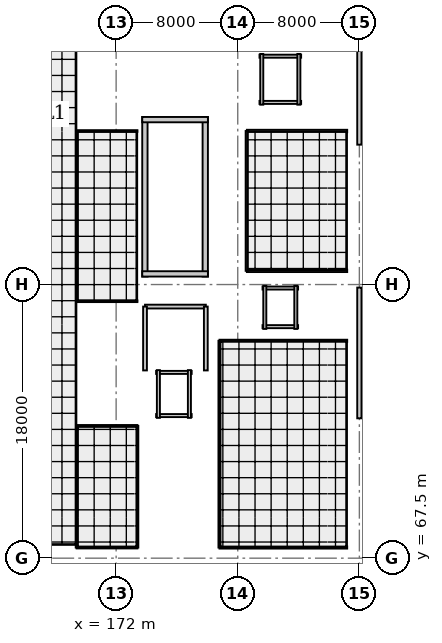
"""IFC4 building model, lengths in metres.
Left out: names, types, materials, properties, quantities, classifications, styles, units other than length and angle.
Written with IfcOpenShell. Run it as: python <this file> out.ifc"""

import sys

from ifc_helpers import new_model, si_unit, direction, frame, frame_2d, origin, origin_2d, place, context, subcontext, project, spatial, rectangle, i_section, extrude, element, fill, save


model = new_model("IFC4")
c1 = context("Model", 3, precision=1e-05, world=origin(), true_north=direction((0.0, 1.0)))
c2 = subcontext(c1, "Body", "Model", "MODEL_VIEW")
j1 = project(units=[si_unit("LENGTHUNIT", "METRE"), si_unit("PLANEANGLEUNIT", "RADIAN")], contexts=[c1])
p1 = place(None, origin())
s1 = spatial("IfcSite", under=j1, at=p1, CompositionType="ELEMENT")
p2 = place(p1, origin())
s2 = spatial("IfcBuilding", under=s1, at=p2, CompositionType="ELEMENT")
p3 = place(p2, frame((0.0, 0.0, 14.4)))
s3 = spatial("IfcBuildingStorey", under=s2, at=p3, CompositionType="ELEMENT", Elevation=14.4)
for number, where, z_axis, x_axis in (
    (1, (172.0, 67.5, 0.0), (0.0, 0.0, 1.0), (1.0, 0.0, 0.0)),
    (2, (172.0, 76.5, 0.0), (0.0, 0.0, 1.0), (1.0, 0.0, 0.0)),
    (3, (172.0, 85.5, 0.0), (0.0, 0.0, 1.0), (1.0, 0.0, 0.0)),
    (4, (172.0, 94.5, 0.0), (0.0, 0.0, 1.0), (1.0, 0.0, 0.0)),
    (5, (180.0, 67.5, 0.0), (0.0, 0.0, 1.0), (1.0, 0.0, 0.0)),
    (6, (180.0, 76.5, 0.0), (0.0, 0.0, 1.0), (1.0, 0.0, 0.0)),
    (7, (180.0, 85.5, 0.0), (0.0, 0.0, 1.0), (1.0, 0.0, 0.0)),
    (8, (180.0, 94.5, 0.0), (0.0, 0.0, 1.0), (1.0, 0.0, 0.0)),
    (9, (188.0, 67.5, 0.0), (0.0, 0.0, 1.0), (1.0, 0.0, 0.0)),
    (10, (188.0, 76.5, 0.0), (0.0, 0.0, 1.0), (1.0, 0.0, 0.0)),
    (11, (188.0, 85.5, 0.0), (0.0, 0.0, 1.0), (1.0, 0.0, 0.0)),
    (12, (188.0, 94.5, 0.0), (0.0, 0.0, 1.0), (1.0, 0.0, 0.0)),
):
    element("IfcColumn", number, at=place(p3, frame(where, z_axis=z_axis, x_axis=x_axis)), inside=s3, PredefinedType="COLUMN", context=c2, shape_type="SweptSolid", body=[
        extrude(i_section(OverallWidth=0.4, OverallDepth=0.4, WebThickness=0.013, FlangeThickness=0.021, FilletRadius=0.022, at=origin_2d()), origin(), (0.0, 0.0, 1.0), 3.2),
    ])
p4 = place(p3, frame((188.0, 85.3, 0.0), z_axis=(0.0, 0.0, 1.0), x_axis=(0.0, -1.0, 0.0)))
e13 = element("IfcWall", 13, at=p4, inside=s3, PredefinedType="SOLIDWALL", context=c2, shape_type="SweptSolid", body=[
    extrude(rectangle(XDim=8.6, YDim=0.28, at=frame_2d((4.3, 0.0))), origin(), (0.0, 0.0, 1.0), 2.485),
])
p5 = place(p4, frame((1.665, 0.0, 0.9)))
e14 = element("IfcOpeningElement", 14, at=p5, cuts=e13, PredefinedType="OPENING", context=c2, shape_type="SweptSolid", body=[
    extrude(rectangle(XDim=1.15, YDim=1.45, at=frame_2d((0.575, 0.725))), frame((0.0, 0.15, 0.0), z_axis=(0.0, -1.0, 0.0), x_axis=(1.0, 0.0, 0.0)), (0.0, 0.0, 1.0), 0.3),
])
p6 = place(p4, frame((5.785, 0.0, 0.9)))
e15 = element("IfcOpeningElement", 15, at=p6, cuts=e13, PredefinedType="OPENING", context=c2, shape_type="SweptSolid", body=[
    extrude(rectangle(XDim=1.15, YDim=1.45, at=frame_2d((0.575, 0.725))), frame((0.0, 0.15, 0.0), z_axis=(0.0, -1.0, 0.0), x_axis=(1.0, 0.0, 0.0)), (0.0, 0.0, 1.0), 0.3),
])
p7 = place(p3, frame((188.0, 103.3, 0.0), z_axis=(0.0, 0.0, 1.0), x_axis=(0.0, -1.0, 0.0)))
e16 = element("IfcWall", 16, at=p7, inside=s3, PredefinedType="SOLIDWALL", context=c2, shape_type="SweptSolid", body=[
    extrude(rectangle(XDim=8.6, YDim=0.28, at=frame_2d((4.3, 0.0))), origin(), (0.0, 0.0, 1.0), 2.395),
])
for number, where, z_axis, x_axis in (
    (17, (177.863, 86.025, 0.0), (0.0, 0.0, 1.0), (0.0, 1.0, 0.0)),
    (18, (173.893, 96.522, 0.0), (0.0, 0.0, 1.0), (0.0, -1.0, 0.0)),
):
    element("IfcWall", number, at=place(p3, frame(where, z_axis=z_axis, x_axis=x_axis)), inside=s3, PredefinedType="SHEAR", context=c2, shape_type="SweptSolid", body=[
        extrude(rectangle(XDim=10.498, YDim=0.35, at=frame_2d((5.249, 0.0))), origin(), (0.0, 0.0, 1.0), 3.0),
    ])
p8 = place(p3, frame((178.038, 96.347, 0.0), z_axis=(0.0, 0.0, 1.0), x_axis=(-1.0, 0.0, 0.0)))
e19 = element("IfcWall", 19, at=p8, inside=s3, PredefinedType="SHEAR", context=c2, shape_type="SweptSolid", body=[
    extrude(rectangle(XDim=4.32, YDim=0.35, at=frame_2d((2.16, 0.0))), origin(), (0.0, 0.0, 1.0), 3.0),
])
p9 = place(p3, frame((173.718, 86.2, 0.0), z_axis=(0.0, 0.0, 1.0), x_axis=(1.0, 0.0, 0.0)))
e20 = element("IfcWall", 20, at=p9, inside=s3, PredefinedType="SHEAR", context=c2, shape_type="SweptSolid", body=[
    extrude(rectangle(XDim=4.32, YDim=0.35, at=frame_2d((2.16, 0.0))), origin(), (0.0, 0.0, 1.0), 3.0),
])
p10 = place(p9, frame((1.15, 0.0, 0.0)))
e21 = element("IfcOpeningElement", 21, at=p10, cuts=e20, PredefinedType="OPENING", context=c2, shape_type="SweptSolid", body=[
    extrude(rectangle(XDim=1.3, YDim=2.1, at=frame_2d((0.65, 1.05))), frame((0.0, 0.185, 0.0), z_axis=(0.0, -1.0, 0.0), x_axis=(1.0, 0.0, 0.0)), (0.0, 0.0, 1.0), 0.37),
])
p11 = place(p3, frame((174.63, 76.88, 0.0), z_axis=(0.0, 0.0, 1.0), x_axis=(1.0, 0.0, 0.0)))
e22 = element("IfcWall", 22, at=p11, inside=s3, PredefinedType="SOLIDWALL", context=c2, shape_type="SweptSolid", body=[
    extrude(rectangle(XDim=2.34, YDim=0.2, at=frame_2d((1.17, 0.0))), origin(), (0.0, 0.0, 1.0), 2.505),
])
p12 = place(p3, frame((176.97, 79.72, 0.0), z_axis=(0.0, 0.0, 1.0), x_axis=(-1.0, 0.0, 0.0)))
e23 = element("IfcWall", 23, at=p12, inside=s3, PredefinedType="SOLIDWALL", context=c2, shape_type="SweptSolid", body=[
    extrude(rectangle(XDim=2.34, YDim=0.2, at=frame_2d((1.17, 0.0))), origin(), (0.0, 0.0, 1.0), 2.975),
])
p13 = place(p12, frame((0.57, 0.0, 0.0)))
e24 = element("IfcOpeningElement", 24, at=p13, cuts=e23, PredefinedType="OPENING", context=c2, shape_type="SweptSolid", body=[
    extrude(rectangle(XDim=1.2, YDim=2.15, at=frame_2d((0.6, 1.075))), frame((0.0, 0.11, 0.0), z_axis=(0.0, -1.0, 0.0), x_axis=(1.0, 0.0, 0.0)), (0.0, 0.0, 1.0), 0.22),
])
for number, where, z_axis, x_axis in (
    (25, (174.78, 79.87, 0.0), (0.0, 0.0, 1.0), (0.0, -1.0, 0.0)),
    (26, (176.82, 76.73, 0.0), (0.0, 0.0, 1.0), (0.0, 1.0, 0.0)),
):
    element("IfcWall", number, at=place(p3, frame(where, z_axis=z_axis, x_axis=x_axis)), inside=s3, PredefinedType="SOLIDWALL", context=c2, shape_type="SweptSolid", body=[
        extrude(rectangle(XDim=3.14, YDim=0.2, at=frame_2d((1.57, 0.0))), origin(), (0.0, 0.0, 1.0), 2.505),
    ])
p14 = place(p3, frame((181.63, 82.73, 0.0), z_axis=(0.0, 0.0, 1.0), x_axis=(1.0, 0.0, 0.0)))
e27 = element("IfcWall", 27, at=p14, inside=s3, PredefinedType="SOLIDWALL", context=c2, shape_type="SweptSolid", body=[
    extrude(rectangle(XDim=2.34, YDim=0.2, at=frame_2d((1.17, 0.0))), origin(), (0.0, 0.0, 1.0), 2.975),
])
p15 = place(p3, frame((183.97, 85.27, 0.0), z_axis=(0.0, 0.0, 1.0), x_axis=(-1.0, 0.0, 0.0)))
e28 = element("IfcWall", 28, at=p15, inside=s3, PredefinedType="SOLIDWALL", context=c2, shape_type="SweptSolid", body=[
    extrude(rectangle(XDim=2.34, YDim=0.2, at=frame_2d((1.17, 0.0))), origin(), (0.0, 0.0, 1.0), 2.535),
])
p16 = place(p15, frame((0.62, 0.0, 0.0)))
e29 = element("IfcOpeningElement", 29, at=p16, cuts=e28, PredefinedType="OPENING", context=c2, shape_type="SweptSolid", body=[
    extrude(rectangle(XDim=1.1, YDim=2.15, at=frame_2d((0.55, 1.075))), frame((0.0, 0.11, 0.0), z_axis=(0.0, -1.0, 0.0), x_axis=(1.0, 0.0, 0.0)), (0.0, 0.0, 1.0), 0.22),
])
for number, where, z_axis, x_axis in (
    (30, (181.78, 85.42, 0.0), (0.0, 0.0, 1.0), (0.0, -1.0, 0.0)),
    (31, (183.82, 82.58, 0.0), (0.0, 0.0, 1.0), (0.0, 1.0, 0.0)),
):
    element("IfcWall", number, at=place(p3, frame(where, z_axis=z_axis, x_axis=x_axis)), inside=s3, PredefinedType="SOLIDWALL", context=c2, shape_type="SweptSolid", body=[
        extrude(rectangle(XDim=2.84, YDim=0.2, at=frame_2d((1.42, 0.0))), origin(), (0.0, 0.0, 1.0), 2.535),
    ])
for number, where, z_axis, x_axis in (
    (32, (181.43, 97.48, 0.0), (0.0, 0.0, 1.0), (1.0, 0.0, 0.0)),
    (33, (184.17, 100.52, 0.0), (0.0, 0.0, 1.0), (-1.0, 0.0, 0.0)),
):
    element("IfcWall", number, at=place(p3, frame(where, z_axis=z_axis, x_axis=x_axis)), inside=s3, PredefinedType="SOLIDWALL", context=c2, shape_type="SweptSolid", body=[
        extrude(rectangle(XDim=2.74, YDim=0.2, at=frame_2d((1.37, 0.0))), origin(), (0.0, 0.0, 1.0), 2.975),
    ])
p17 = place(p3, frame((181.58, 100.67, 0.0), z_axis=(0.0, 0.0, 1.0), x_axis=(0.0, -1.0, 0.0)))
e34 = element("IfcWall", 34, at=p17, inside=s3, PredefinedType="SOLIDWALL", context=c2, shape_type="SweptSolid", body=[
    extrude(rectangle(XDim=3.34, YDim=0.2, at=frame_2d((1.67, 0.0))), origin(), (0.0, 0.0, 1.0), 2.975),
])
p18 = place(p17, frame((0.92, 0.0, 0.0)))
e35 = element("IfcOpeningElement", 35, at=p18, cuts=e34, PredefinedType="OPENING", context=c2, shape_type="SweptSolid", body=[
    extrude(rectangle(XDim=1.5, YDim=2.2, at=frame_2d((0.75, 1.1))), frame((0.0, 0.11, 0.0), z_axis=(0.0, -1.0, 0.0), x_axis=(1.0, 0.0, 0.0)), (0.0, 0.0, 1.0), 0.22),
])
p19 = place(p3, frame((184.02, 97.33, 0.0), z_axis=(0.0, 0.0, 1.0), x_axis=(0.0, 1.0, 0.0)))
e36 = element("IfcWall", 36, at=p19, inside=s3, PredefinedType="SOLIDWALL", context=c2, shape_type="SweptSolid", body=[
    extrude(rectangle(XDim=3.34, YDim=0.2, at=frame_2d((1.67, 0.0))), origin(), (0.0, 0.0, 1.0), 2.975),
])
for number, where, z_axis, x_axis in (
    (37, (173.4, 68.2, 0.0), (0.0, 0.0, 1.0), (-1.0, 0.0, 0.0)),
    (38, (169.4, 76.2, 0.0), (0.0, 0.0, 1.0), (1.0, 0.0, 0.0)),
):
    element("IfcWall", number, at=place(p3, frame(where, z_axis=z_axis, x_axis=x_axis)), inside=s3, PredefinedType="PARTITIONING", context=c2, shape_type="SweptSolid", body=[
        extrude(rectangle(XDim=4.0, YDim=0.12, at=frame_2d((2.0, 0.0))), origin(), (0.0, 0.0, 1.0), 2.505),
    ])
p20 = place(p3, frame((169.4, 68.2, 0.0), z_axis=(0.0, 0.0, 1.0), x_axis=(0.0, 1.0, 0.0)))
e39 = element("IfcWall", 39, at=p20, inside=s3, PredefinedType="PARTITIONING", context=c2, shape_type="SweptSolid", body=[
    extrude(rectangle(XDim=8.0, YDim=0.12, at=frame_2d((4.0, 0.0))), origin(), (0.0, 0.0, 1.0), 2.505),
])
p21 = place(p20, frame((3.49, 0.0, 0.0)))
e40 = element("IfcOpeningElement", 40, at=p21, cuts=e39, PredefinedType="OPENING", context=c2, shape_type="SweptSolid", body=[
    extrude(rectangle(XDim=1.02, YDim=2.05, at=frame_2d((0.51, 1.025))), frame((0.0, 0.07, 0.0), z_axis=(0.0, -1.0, 0.0), x_axis=(1.0, 0.0, 0.0)), (0.0, 0.0, 1.0), 0.14),
])
p22 = place(p3, frame((173.4, 76.2, 0.0), z_axis=(0.0, 0.0, 1.0), x_axis=(0.0, -1.0, 0.0)))
e41 = element("IfcWall", 41, at=p22, inside=s3, PredefinedType="PARTITIONING", context=c2, shape_type="SweptSolid", body=[
    extrude(rectangle(XDim=8.0, YDim=0.12, at=frame_2d((4.0, 0.0))), origin(), (0.0, 0.0, 1.0), 2.505),
])
for number, where, z_axis, x_axis in (
    (42, (173.4, 84.4, 0.0), (0.0, 0.0, 1.0), (-1.0, 0.0, 0.0)),
    (43, (169.4, 95.6, 0.0), (0.0, 0.0, 1.0), (1.0, 0.0, 0.0)),
):
    element("IfcWall", number, at=place(p3, frame(where, z_axis=z_axis, x_axis=x_axis)), inside=s3, PredefinedType="PARTITIONING", context=c2, shape_type="SweptSolid", body=[
        extrude(rectangle(XDim=4.0, YDim=0.11, at=frame_2d((2.0, 0.0))), origin(), (0.0, 0.0, 1.0), 2.585),
    ])
p23 = place(p3, frame((169.4, 84.4, 0.0), z_axis=(0.0, 0.0, 1.0), x_axis=(0.0, 1.0, 0.0)))
e44 = element("IfcWall", 44, at=p23, inside=s3, PredefinedType="PARTITIONING", context=c2, shape_type="SweptSolid", body=[
    extrude(rectangle(XDim=11.2, YDim=0.11, at=frame_2d((5.6, 0.0))), origin(), (0.0, 0.0, 1.0), 2.535),
])
p24 = place(p23, frame((5.075, 0.0, 0.0)))
e45 = element("IfcOpeningElement", 45, at=p24, cuts=e44, PredefinedType="OPENING", context=c2, shape_type="SweptSolid", body=[
    extrude(rectangle(XDim=1.05, YDim=2.1, at=frame_2d((0.525, 1.05))), frame((0.0, 0.065, 0.0), z_axis=(0.0, -1.0, 0.0), x_axis=(1.0, 0.0, 0.0)), (0.0, 0.0, 1.0), 0.13),
])
p25 = place(p3, frame((187.2, 86.4, 0.0), z_axis=(0.0, 0.0, 1.0), x_axis=(-1.0, 0.0, 0.0)))
e46 = element("IfcWall", 46, at=p25, inside=s3, PredefinedType="PARTITIONING", context=c2, shape_type="SweptSolid", body=[
    extrude(rectangle(XDim=6.6, YDim=0.16, at=frame_2d((3.3, 0.0))), origin(), (0.0, 0.0, 1.0), 2.515),
])
p26 = place(p3, frame((180.6, 95.6, 0.0), z_axis=(0.0, 0.0, 1.0), x_axis=(1.0, 0.0, 0.0)))
e47 = element("IfcWall", 47, at=p26, inside=s3, PredefinedType="PARTITIONING", context=c2, shape_type="SweptSolid", body=[
    extrude(rectangle(XDim=6.6, YDim=0.16, at=frame_2d((3.3, 0.0))), origin(), (0.0, 0.0, 1.0), 2.515),
])
p27 = place(p26, frame((2.775, 0.0, 0.0)))
e48 = element("IfcOpeningElement", 48, at=p27, cuts=e47, PredefinedType="OPENING", context=c2, shape_type="SweptSolid", body=[
    extrude(rectangle(XDim=1.05, YDim=2.1, at=frame_2d((0.525, 1.05))), frame((0.0, 0.09, 0.0), z_axis=(0.0, -1.0, 0.0), x_axis=(1.0, 0.0, 0.0)), (0.0, 0.0, 1.0), 0.18),
])
p28 = place(p3, frame((180.6, 86.4, 0.0), z_axis=(0.0, 0.0, 1.0), x_axis=(0.0, 1.0, 0.0)))
e49 = element("IfcWall", 49, at=p28, inside=s3, PredefinedType="PARTITIONING", context=c2, shape_type="SweptSolid", body=[
    extrude(rectangle(XDim=9.2, YDim=0.16, at=frame_2d((4.6, 0.0))), origin(), (0.0, 0.0, 1.0), 2.535),
])
p29 = place(p3, frame((187.2, 68.2, 0.0), z_axis=(0.0, 0.0, 1.0), x_axis=(-1.0, 0.0, 0.0)))
e50 = element("IfcWall", 50, at=p29, inside=s3, PredefinedType="PARTITIONING", context=c2, shape_type="SweptSolid", body=[
    extrude(rectangle(XDim=8.4, YDim=0.14, at=frame_2d((4.2, 0.0))), origin(), (0.0, 0.0, 1.0), 2.485),
])
p30 = place(p3, frame((178.8, 81.8, 0.0), z_axis=(0.0, 0.0, 1.0), x_axis=(1.0, 0.0, 0.0)))
e51 = element("IfcWall", 51, at=p30, inside=s3, PredefinedType="PARTITIONING", context=c2, shape_type="SweptSolid", body=[
    extrude(rectangle(XDim=8.4, YDim=0.14, at=frame_2d((4.2, 0.0))), origin(), (0.0, 0.0, 1.0), 2.515),
])
p31 = place(p3, frame((178.8, 68.2, 0.0), z_axis=(0.0, 0.0, 1.0), x_axis=(0.0, 1.0, 0.0)))
e52 = element("IfcWall", 52, at=p31, inside=s3, PredefinedType="PARTITIONING", context=c2, shape_type="SweptSolid", body=[
    extrude(rectangle(XDim=13.6, YDim=0.14, at=frame_2d((6.8, 0.0))), origin(), (0.0, 0.0, 1.0), 2.505),
])
p32 = place(p31, frame((6.225, 0.0, 0.0)))
e53 = element("IfcOpeningElement", 53, at=p32, cuts=e52, PredefinedType="OPENING", context=c2, shape_type="SweptSolid", body=[
    extrude(rectangle(XDim=1.15, YDim=2.1, at=frame_2d((0.575, 1.05))), frame((0.0, 0.08, 0.0), z_axis=(0.0, -1.0, 0.0), x_axis=(1.0, 0.0, 0.0)), (0.0, 0.0, 1.0), 0.16),
])
p33 = place(p3, frame((173.9, 84.05, 0.0), z_axis=(0.0, 0.0, 1.0), x_axis=(1.0, 0.0, 0.0)))
e54 = element("IfcWall", 54, at=p33, inside=s3, PredefinedType="SOLIDWALL", context=c2, shape_type="SweptSolid", body=[
    extrude(rectangle(XDim=4.0, YDim=0.25, at=frame_2d((2.0, 0.0))), origin(), (0.0, 0.0, 1.0), 2.975),
])
p34 = place(p3, frame((173.9, 79.85, 0.0), z_axis=(0.0, 0.0, 1.0), x_axis=(0.0, 1.0, 0.0)))
e55 = element("IfcWall", 55, at=p34, inside=s3, PredefinedType="SOLIDWALL", context=c2, shape_type="SweptSolid", body=[
    extrude(rectangle(XDim=4.2, YDim=0.25, at=frame_2d((2.1, 0.0))), origin(), (0.0, 0.0, 1.0), 2.975),
])
p35 = place(p34, frame((1.4, 0.0, 0.0)))
e56 = element("IfcOpeningElement", 56, at=p35, cuts=e55, PredefinedType="OPENING", context=c2, shape_type="SweptSolid", body=[
    extrude(rectangle(XDim=1.4, YDim=2.1, at=frame_2d((0.7, 1.05))), frame((0.0, 0.135, 0.0), z_axis=(0.0, -1.0, 0.0), x_axis=(1.0, 0.0, 0.0)), (0.0, 0.0, 1.0), 0.27),
])
p36 = place(p3, frame((177.9, 84.05, 0.0), z_axis=(0.0, 0.0, 1.0), x_axis=(0.0, -1.0, 0.0)))
e57 = element("IfcWall", 57, at=p36, inside=s3, PredefinedType="SOLIDWALL", context=c2, shape_type="SweptSolid", body=[
    extrude(rectangle(XDim=4.2, YDim=0.25, at=frame_2d((2.1, 0.0))), origin(), (0.0, 0.0, 1.0), 2.975),
])
p37 = place(p5, origin())
e58 = element("IfcWindow", 58, at=p37, inside=s3, PartitioningType="SINGLE_PANEL", PredefinedType="WINDOW", context=c2, shape_type="SweptSolid", body=[
    extrude(rectangle(XDim=1.15, YDim=1.45, at=frame_2d((0.575, 0.725))), frame((0.0, 0.03, 0.0), z_axis=(0.0, -1.0, 0.0), x_axis=(1.0, 0.0, 0.0)), (0.0, 0.0, 1.0), 0.06),
])
fill(e14, e58)
p38 = place(p6, origin())
e59 = element("IfcWindow", 59, at=p38, inside=s3, PartitioningType="SINGLE_PANEL", PredefinedType="WINDOW", context=c2, shape_type="SweptSolid", body=[
    extrude(rectangle(XDim=1.15, YDim=1.45, at=frame_2d((0.575, 0.725))), frame((0.0, 0.03, 0.0), z_axis=(0.0, -1.0, 0.0), x_axis=(1.0, 0.0, 0.0)), (0.0, 0.0, 1.0), 0.06),
])
fill(e15, e59)
p39 = place(p10, origin())
e60 = element("IfcDoor", 60, at=p39, inside=s3, OperationType="SINGLE_SWING_LEFT", PredefinedType="DOOR", context=c2, shape_type="SweptSolid", body=[
    extrude(rectangle(XDim=1.3, YDim=2.1, at=frame_2d((0.65, 1.05))), frame((0.0, 0.025, 0.0), z_axis=(0.0, -1.0, 0.0), x_axis=(1.0, 0.0, 0.0)), (0.0, 0.0, 1.0), 0.05),
])
fill(e21, e60)
p40 = place(p13, origin())
e61 = element("IfcDoor", 61, at=p40, inside=s3, OperationType="SLIDING_TO_LEFT", PredefinedType="DOOR", context=c2, shape_type="SweptSolid", body=[
    extrude(rectangle(XDim=1.2, YDim=2.15, at=frame_2d((0.6, 1.075))), frame((0.0, 0.025, 0.0), z_axis=(0.0, -1.0, 0.0), x_axis=(1.0, 0.0, 0.0)), (0.0, 0.0, 1.0), 0.05),
])
fill(e24, e61)
p41 = place(p16, origin())
e62 = element("IfcDoor", 62, at=p41, inside=s3, OperationType="SLIDING_TO_LEFT", PredefinedType="DOOR", context=c2, shape_type="SweptSolid", body=[
    extrude(rectangle(XDim=1.1, YDim=2.15, at=frame_2d((0.55, 1.075))), frame((0.0, 0.025, 0.0), z_axis=(0.0, -1.0, 0.0), x_axis=(1.0, 0.0, 0.0)), (0.0, 0.0, 1.0), 0.05),
])
fill(e29, e62)
p42 = place(p18, origin())
e63 = element("IfcDoor", 63, at=p42, inside=s3, OperationType="SLIDING_TO_LEFT", PredefinedType="DOOR", context=c2, shape_type="SweptSolid", body=[
    extrude(rectangle(XDim=1.5, YDim=2.2, at=frame_2d((0.75, 1.1))), frame((0.0, 0.025, 0.0), z_axis=(0.0, -1.0, 0.0), x_axis=(1.0, 0.0, 0.0)), (0.0, 0.0, 1.0), 0.05),
])
fill(e35, e63)
p43 = place(p21, origin())
e64 = element("IfcDoor", 64, at=p43, inside=s3, OperationType="SINGLE_SWING_RIGHT", PredefinedType="DOOR", context=c2, shape_type="SweptSolid", body=[
    extrude(rectangle(XDim=1.02, YDim=2.05, at=frame_2d((0.51, 1.025))), frame((0.0, 0.025, 0.0), z_axis=(0.0, -1.0, 0.0), x_axis=(1.0, 0.0, 0.0)), (0.0, 0.0, 1.0), 0.05),
])
fill(e40, e64)
p44 = place(p24, origin())
e65 = element("IfcDoor", 65, at=p44, inside=s3, OperationType="SINGLE_SWING_LEFT", PredefinedType="DOOR", context=c2, shape_type="SweptSolid", body=[
    extrude(rectangle(XDim=1.05, YDim=2.1, at=frame_2d((0.525, 1.05))), frame((0.0, 0.025, 0.0), z_axis=(0.0, -1.0, 0.0), x_axis=(1.0, 0.0, 0.0)), (0.0, 0.0, 1.0), 0.05),
])
fill(e45, e65)
p45 = place(p27, origin())
e66 = element("IfcDoor", 66, at=p45, inside=s3, OperationType="SINGLE_SWING_RIGHT", PredefinedType="DOOR", context=c2, shape_type="SweptSolid", body=[
    extrude(rectangle(XDim=1.05, YDim=2.1, at=frame_2d((0.525, 1.05))), frame((0.0, 0.025, 0.0), z_axis=(0.0, -1.0, 0.0), x_axis=(1.0, 0.0, 0.0)), (0.0, 0.0, 1.0), 0.05),
])
fill(e48, e66)
p46 = place(p32, origin())
e67 = element("IfcDoor", 67, at=p46, inside=s3, OperationType="SINGLE_SWING_RIGHT", PredefinedType="DOOR", context=c2, shape_type="SweptSolid", body=[
    extrude(rectangle(XDim=1.15, YDim=2.1, at=frame_2d((0.575, 1.05))), frame((0.0, 0.025, 0.0), z_axis=(0.0, -1.0, 0.0), x_axis=(1.0, 0.0, 0.0)), (0.0, 0.0, 1.0), 0.05),
])
fill(e53, e67)
p47 = place(p35, origin())
e68 = element("IfcDoor", 68, at=p47, inside=s3, OperationType="SINGLE_SWING_RIGHT", PredefinedType="DOOR", context=c2, shape_type="SweptSolid", body=[
    extrude(rectangle(XDim=1.4, YDim=2.1, at=frame_2d((0.7, 1.05))), frame((0.0, 0.025, 0.0), z_axis=(0.0, -1.0, 0.0), x_axis=(1.0, 0.0, 0.0)), (0.0, 0.0, 1.0), 0.05),
])
fill(e56, e68)
save(model, sys.argv[1])
